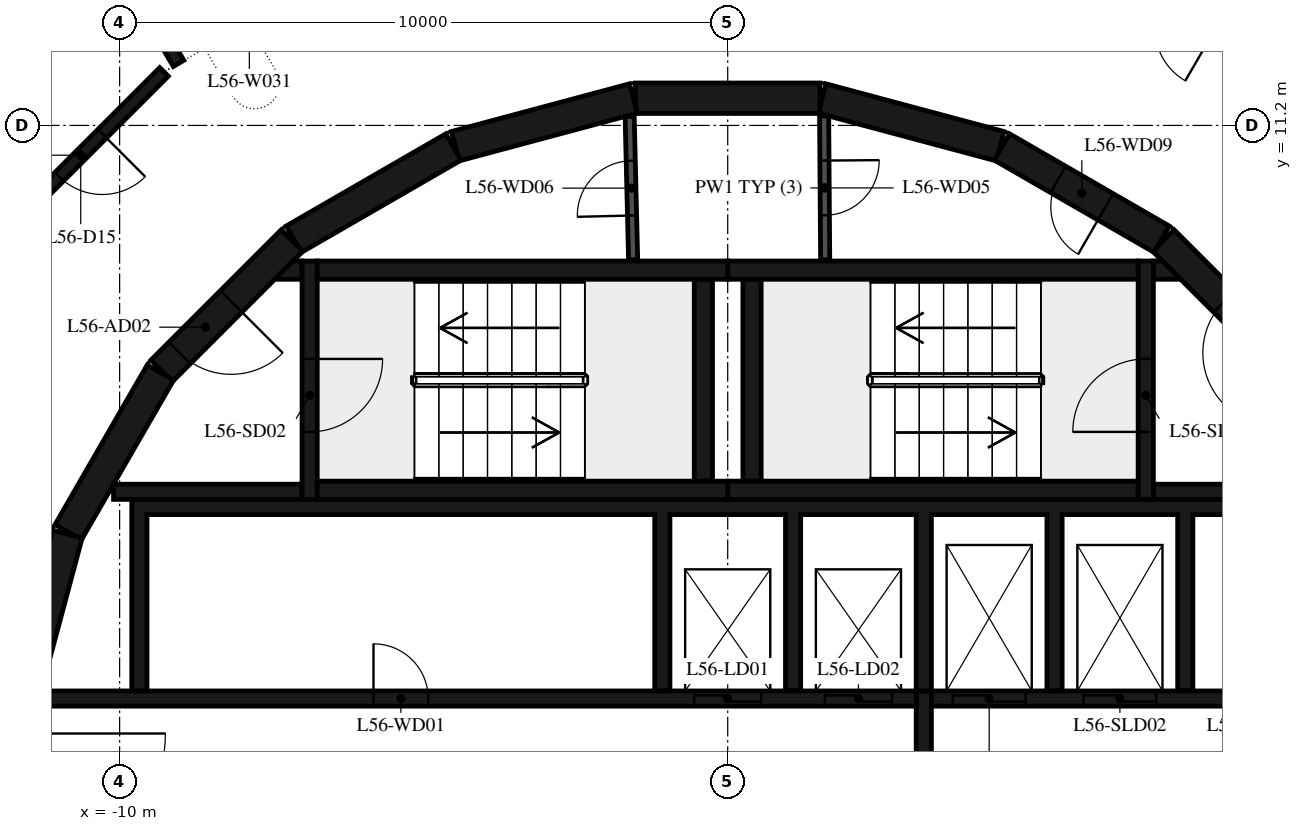
"""IFC4 building model, lengths in metres.
Left out: names, types, materials, properties, quantities, classifications, styles, units other than length and angle.
Written with IfcOpenShell. Run it as: python <this file> out.ifc"""

import sys

from ifc_helpers import new_model, si_unit, direction, frame, frame_2d, origin, place, context, subcontext, project, spatial, polyline, rectangle, outline, extrude, element, fill, save


model = new_model("IFC4")
c1 = context("Model", 3, precision=1e-05, world=origin(), true_north=direction((0.0, 1.0)))
c2 = subcontext(c1, "Body", "Model", "MODEL_VIEW")
j1 = project(units=[si_unit("LENGTHUNIT", "METRE"), si_unit("PLANEANGLEUNIT", "RADIAN")], contexts=[c1])
p1 = place(None, origin())
s1 = spatial("IfcSite", under=j1, at=p1, CompositionType="ELEMENT")
p2 = place(p1, origin())
s2 = spatial("IfcBuilding", under=s1, at=p2, CompositionType="ELEMENT")
p3 = place(p2, frame((0.0, 0.0, 219.9)))
s3 = spatial("IfcBuildingStorey", under=s2, at=p3, CompositionType="ELEMENT", Elevation=219.9)
p4 = place(p3, frame((9.308, 7.164, 0.0), z_axis=(0.0, 0.0, 1.0), x_axis=(-0.707106781187, 0.707106781187, 0.0)))
e1 = element("IfcWall", 1, at=p4, inside=s3, PredefinedType="SHEAR", context=c2, shape_type="SweptSolid", body=[
    extrude(rectangle(XDim=3.032, YDim=0.5, at=frame_2d((1.516, 0.0))), origin(), (0.0, 0.0, 1.0), 6.35),
])
p5 = place(p4, frame((0.416, 0.0, 0.0)))
e2 = element("IfcOpeningElement", 2, at=p5, cuts=e1, PredefinedType="OPENING", context=c2, shape_type="SweptSolid", body=[
    extrude(rectangle(XDim=1.2, YDim=2.1, at=frame_2d((0.6, 1.05))), frame((0.0, 0.26, 0.0), z_axis=(0.0, -1.0, 0.0), x_axis=(1.0, 0.0, 0.0)), (0.0, 0.0, 1.0), 0.52),
])
p6 = place(p3, frame((7.137, 9.329, 0.0), z_axis=(0.0, 0.0, 1.0), x_axis=(-0.865975092491, 0.500087131594, 0.0)))
e3 = element("IfcWall", 3, at=p6, inside=s3, PredefinedType="SHEAR", context=c2, shape_type="SweptSolid", body=[
    extrude(rectangle(XDim=3.033, YDim=0.5, at=frame_2d((1.516, 0.0))), origin(), (0.0, 0.0, 1.0), 6.35),
])
p7 = place(p6, frame((1.066, 0.0, 0.0)))
e4 = element("IfcOpeningElement", 4, at=p7, cuts=e3, PredefinedType="OPENING", context=c2, shape_type="SweptSolid", body=[
    extrude(rectangle(XDim=0.9, YDim=2.1, at=frame_2d((0.45, 1.05))), frame((0.0, 0.26, 0.0), z_axis=(0.0, -1.0, 0.0), x_axis=(1.0, 0.0, 0.0)), (0.0, 0.0, 1.0), 0.52),
])
for number, where, z_axis, x_axis in (
    (5, (4.479, 10.858, 0.0), (0.0, 0.0, 1.0), (-0.966, 0.259, 0.0)),
    (6, (1.516, 11.647, 0.0), (0.0, 0.0, 1.0), (-1.0, 0.0, 0.0)),
    (7, (-1.55, 11.643, 0.0), (0.0, 0.0, 1.0), (-0.966, -0.259, 0.0)),
    (8, (-4.51, 10.845, 0.0), (0.0, 0.0, 1.0), (-0.866, -0.5, 0.0)),
):
    element("IfcWall", number, at=place(p3, frame(where, z_axis=z_axis, x_axis=x_axis)), inside=s3, PredefinedType="SHEAR", context=c2, shape_type="SweptSolid", body=[
        extrude(rectangle(XDim=3.033, YDim=0.5, at=frame_2d((1.516, 0.0))), origin(), (0.0, 0.0, 1.0), 6.35),
    ])
p8 = place(p3, frame((-7.164, 9.308, 0.0), z_axis=(0.0, 0.0, 1.0), x_axis=(-0.707106781187, -0.707106781187, 0.0)))
e9 = element("IfcWall", 9, at=p8, inside=s3, PredefinedType="SHEAR", context=c2, shape_type="SweptSolid", body=[
    extrude(rectangle(XDim=3.032, YDim=0.5, at=frame_2d((1.516, 0.0))), origin(), (0.0, 0.0, 1.0), 6.35),
])
p9 = place(p8, frame((1.416, 0.0, 0.0)))
e10 = element("IfcOpeningElement", 10, at=p9, cuts=e9, PredefinedType="OPENING", context=c2, shape_type="SweptSolid", body=[
    extrude(rectangle(XDim=1.2, YDim=2.1, at=frame_2d((0.6, 1.05))), frame((0.0, 0.26, 0.0), z_axis=(0.0, -1.0, 0.0), x_axis=(1.0, 0.0, 0.0)), (0.0, 0.0, 1.0), 0.52),
])
for number, where, z_axis, x_axis in (
    (11, (-9.329, 7.137, 0.0), (0.0, 0.0, 1.0), (-0.5, -0.866, 0.0)),
    (12, (-10.858, 4.479, 0.0), (0.0, 0.0, 1.0), (-0.259, -0.966, 0.0)),
):
    element("IfcWall", number, at=place(p3, frame(where, z_axis=z_axis, x_axis=x_axis)), inside=s3, PredefinedType="SHEAR", context=c2, shape_type="SweptSolid", body=[
        extrude(rectangle(XDim=3.033, YDim=0.5, at=frame_2d((1.516, 0.0))), origin(), (0.0, 0.0, 1.0), 6.35),
    ])
for number, where, z_axis, x_axis in (
    (13, (0.0, 5.2, 0.0), (0.0, 0.0, 1.0), (1.0, 0.0, 0.0)),
    (14, (0.0, 8.82, 0.0), (0.0, 0.0, 1.0), (1.0, 0.0, 0.0)),
):
    element("IfcWall", number, at=place(p3, frame(where, z_axis=z_axis, x_axis=x_axis)), inside=s3, PredefinedType="SHEAR", context=c2, shape_type="SweptSolid", body=[
        extrude(rectangle(XDim=6.75, YDim=0.3, at=frame_2d((3.375, 0.0))), origin(), (0.0, 0.0, 1.0), 6.35),
    ])
p10 = place(p3, frame((0.4, 5.35, 0.0), z_axis=(0.0, 0.0, 1.0), x_axis=(0.0, 1.0, 0.0)))
e15 = element("IfcWall", 15, at=p10, inside=s3, PredefinedType="SHEAR", context=c2, shape_type="SweptSolid", body=[
    extrude(rectangle(XDim=3.32, YDim=0.3, at=frame_2d((1.66, 0.0))), origin(), (0.0, 0.0, 1.0), 6.35),
])
p11 = place(p3, frame((6.875, 5.05, 0.0), z_axis=(0.0, 0.0, 1.0), x_axis=(0.0, 1.0, 0.0)))
e16 = element("IfcWall", 16, at=p11, inside=s3, PredefinedType="SHEAR", context=c2, shape_type="SweptSolid", body=[
    extrude(rectangle(XDim=3.92, YDim=0.25, at=frame_2d((1.96, 0.0))), origin(), (0.0, 0.0, 1.0), 6.35),
])
p12 = place(p11, frame((1.11, 0.0, 0.0)))
e17 = element("IfcOpeningElement", 17, at=p12, cuts=e16, PredefinedType="OPENING", context=c2, shape_type="SweptSolid", body=[
    extrude(rectangle(XDim=1.2, YDim=2.1, at=frame_2d((0.6, 1.05))), frame((0.0, 0.135, 0.0), z_axis=(0.0, -1.0, 0.0), x_axis=(1.0, 0.0, 0.0)), (0.0, 0.0, 1.0), 0.27),
])
p13 = place(p3, frame((7.0, 5.175, 0.0), z_axis=(0.0, 0.0, 1.0), x_axis=(1.0, 0.0, 0.0)))
e18 = element("IfcWall", 18, at=p13, inside=s3, PredefinedType="SHEAR", context=c2, shape_type="SweptSolid", body=[
    extrude(rectangle(XDim=3.1, YDim=0.25, at=frame_2d((1.55, 0.0))), origin(), (0.0, 0.0, 1.0), 6.35),
])
p14 = place(p3, origin())
e19 = element("IfcWall", 19, at=p14, inside=s3, PredefinedType="SHEAR", context=c2, shape_type="SweptSolid", body=[
    extrude(outline(polyline([(7.448, 8.67), (7.0, 8.67), (7.0, 8.97), (7.148, 8.97), (7.448, 8.67)])), origin(), (0.0, 0.0, 1.0), 6.35),
])
for number, where, z_axis, x_axis in (
    (20, (-6.75, 5.2, 0.0), (0.0, 0.0, 1.0), (1.0, 0.0, 0.0)),
    (21, (-6.75, 8.82, 0.0), (0.0, 0.0, 1.0), (1.0, 0.0, 0.0)),
):
    element("IfcWall", number, at=place(p3, frame(where, z_axis=z_axis, x_axis=x_axis)), inside=s3, PredefinedType="SHEAR", context=c2, shape_type="SweptSolid", body=[
        extrude(rectangle(XDim=6.75, YDim=0.3, at=frame_2d((3.375, 0.0))), origin(), (0.0, 0.0, 1.0), 6.35),
    ])
p15 = place(p3, frame((-0.4, 5.35, 0.0), z_axis=(0.0, 0.0, 1.0), x_axis=(0.0, 1.0, 0.0)))
e22 = element("IfcWall", 22, at=p15, inside=s3, PredefinedType="SHEAR", context=c2, shape_type="SweptSolid", body=[
    extrude(rectangle(XDim=3.32, YDim=0.3, at=frame_2d((1.66, 0.0))), origin(), (0.0, 0.0, 1.0), 6.35),
])
p16 = place(p3, frame((-6.875, 8.97, 0.0), z_axis=(0.0, 0.0, 1.0), x_axis=(0.0, -1.0, 0.0)))
e23 = element("IfcWall", 23, at=p16, inside=s3, PredefinedType="SHEAR", context=c2, shape_type="SweptSolid", body=[
    extrude(rectangle(XDim=3.92, YDim=0.25, at=frame_2d((1.96, 0.0))), origin(), (0.0, 0.0, 1.0), 6.35),
])
p17 = place(p16, frame((1.61, 0.0, 0.0)))
e24 = element("IfcOpeningElement", 24, at=p17, cuts=e23, PredefinedType="OPENING", context=c2, shape_type="SweptSolid", body=[
    extrude(rectangle(XDim=1.2, YDim=2.1, at=frame_2d((0.6, 1.05))), frame((0.0, 0.135, 0.0), z_axis=(0.0, -1.0, 0.0), x_axis=(1.0, 0.0, 0.0)), (0.0, 0.0, 1.0), 0.27),
])
p18 = place(p3, frame((-7.0, 5.175, 0.0), z_axis=(0.0, 0.0, 1.0), x_axis=(-1.0, 0.0, 0.0)))
e25 = element("IfcWall", 25, at=p18, inside=s3, PredefinedType="SHEAR", context=c2, shape_type="SweptSolid", body=[
    extrude(rectangle(XDim=3.1, YDim=0.25, at=frame_2d((1.55, 0.0))), origin(), (0.0, 0.0, 1.0), 6.35),
])
p19 = place(p3, origin())
e26 = element("IfcWall", 26, at=p19, inside=s3, PredefinedType="SHEAR", context=c2, shape_type="SweptSolid", body=[
    extrude(outline(polyline([(-7.148, 8.97), (-7.0, 8.97), (-7.0, 8.67), (-7.448, 8.67), (-7.148, 8.97)])), origin(), (0.0, 0.0, 1.0), 6.35),
])
p20 = place(p3, origin())
e27 = element("IfcWall", 27, at=p20, inside=s3, PredefinedType="SHEAR", context=c2, shape_type="SweptSolid", body=[
    extrude(outline(polyline([(-9.55, 4.8), (-1.2, 4.8), (-1.2, 1.9), (-0.95, 1.9), (-0.95, 4.8), (0.95, 4.8), (0.95, 1.9), (1.2, 1.9), (1.2, 4.8), (3.1, 4.8), (3.1, 1.9), (3.35, 1.9), (3.35, 4.8), (5.25, 4.8), (5.25, 1.9), (5.5, 1.9), (5.5, 4.8), (7.4, 4.8), (7.4, 1.9), (7.65, 1.9), (7.65, 4.8), (9.55, 4.8), (9.55, 1.9), (9.8, 1.9), (9.8, 4.8), (9.8, 5.05), (-9.8, 5.05), (-9.8, 4.8), (-9.8, 1.9), (-9.55, 1.9), (-9.55, 4.8)])), origin(), (0.0, 0.0, 1.0), 6.35),
])
p21 = place(p3, frame((-11.28, 1.775, 0.0), z_axis=(0.0, 0.0, 1.0), x_axis=(1.0, 0.0, 0.0)))
e28 = element("IfcWall", 28, at=p21, inside=s3, PredefinedType="SHEAR", context=c2, shape_type="SweptSolid", body=[
    extrude(rectangle(XDim=14.38, YDim=0.25, at=frame_2d((7.19, 0.0))), origin(), (0.0, 0.0, 1.0), 6.35),
])
p22 = place(p21, frame((10.73, 0.0, 0.0)))
e29 = element("IfcOpeningElement", 29, at=p22, cuts=e28, PredefinedType="OPENING", context=c2, shape_type="SweptSolid", body=[
    extrude(rectangle(XDim=1.1, YDim=2.1, at=frame_2d((0.55, 1.05))), frame((0.0, 0.135, 0.0), z_axis=(0.0, -1.0, 0.0), x_axis=(1.0, 0.0, 0.0)), (0.0, 0.0, 1.0), 0.27),
])
p23 = place(p21, frame((12.88, 0.0, 0.0)))
e30 = element("IfcOpeningElement", 30, at=p23, cuts=e28, PredefinedType="OPENING", context=c2, shape_type="SweptSolid", body=[
    extrude(rectangle(XDim=1.1, YDim=2.1, at=frame_2d((0.55, 1.05))), frame((0.0, 0.135, 0.0), z_axis=(0.0, -1.0, 0.0), x_axis=(1.0, 0.0, 0.0)), (0.0, 0.0, 1.0), 0.27),
])
p24 = place(p21, frame((5.455, 0.0, 0.0)))
e31 = element("IfcOpeningElement", 31, at=p24, cuts=e28, PredefinedType="OPENING", context=c2, shape_type="SweptSolid", body=[
    extrude(rectangle(XDim=0.9, YDim=2.1, at=frame_2d((0.45, 1.05))), frame((0.0, 0.135, 0.0), z_axis=(0.0, -1.0, 0.0), x_axis=(1.0, 0.0, 0.0)), (0.0, 0.0, 1.0), 0.27),
])
p25 = place(p3, frame((3.35, 1.775, 0.0), z_axis=(0.0, 0.0, 1.0), x_axis=(1.0, 0.0, 0.0)))
e32 = element("IfcWall", 32, at=p25, inside=s3, PredefinedType="SHEAR", context=c2, shape_type="SweptSolid", body=[
    extrude(rectangle(XDim=7.93, YDim=0.25, at=frame_2d((3.965, 0.0))), origin(), (0.0, 0.0, 1.0), 6.35),
])
p26 = place(p25, frame((0.35, 0.0, 0.0)))
e33 = element("IfcOpeningElement", 33, at=p26, cuts=e32, PredefinedType="OPENING", context=c2, shape_type="SweptSolid", body=[
    extrude(rectangle(XDim=1.2, YDim=2.4, at=frame_2d((0.6, 1.2))), frame((0.0, 0.135, 0.0), z_axis=(0.0, -1.0, 0.0), x_axis=(1.0, 0.0, 0.0)), (0.0, 0.0, 1.0), 0.27),
])
p27 = place(p25, frame((2.5, 0.0, 0.0)))
e34 = element("IfcOpeningElement", 34, at=p27, cuts=e32, PredefinedType="OPENING", context=c2, shape_type="SweptSolid", body=[
    extrude(rectangle(XDim=1.2, YDim=2.4, at=frame_2d((0.6, 1.2))), frame((0.0, 0.135, 0.0), z_axis=(0.0, -1.0, 0.0), x_axis=(1.0, 0.0, 0.0)), (0.0, 0.0, 1.0), 0.27),
])
p28 = place(p25, frame((4.8, 0.0, 0.0)))
e35 = element("IfcOpeningElement", 35, at=p28, cuts=e32, PredefinedType="OPENING", context=c2, shape_type="SweptSolid", body=[
    extrude(rectangle(XDim=0.9, YDim=2.1, at=frame_2d((0.45, 1.05))), frame((0.0, 0.135, 0.0), z_axis=(0.0, -1.0, 0.0), x_axis=(1.0, 0.0, 0.0)), (0.0, 0.0, 1.0), 0.27),
])
p29 = place(p3, frame((3.225, -1.9, 0.0), z_axis=(0.0, 0.0, 1.0), x_axis=(0.0, 1.0, 0.0)))
e36 = element("IfcWall", 36, at=p29, inside=s3, PredefinedType="SHEAR", context=c2, shape_type="SweptSolid", body=[
    extrude(rectangle(XDim=3.8, YDim=0.25, at=frame_2d((1.9, 0.0))), origin(), (0.0, 0.0, 1.0), 6.35),
])
p30 = place(p3, frame((1.586, 11.354, 0.0), z_axis=(0.0, 0.0, 1.0), x_axis=(0.007227482881, -0.999973881405, 0.0)))
e37 = element("IfcWall", 37, at=p30, inside=s3, PredefinedType="PARTITIONING", context=c2, shape_type="SweptSolid", body=[
    extrude(rectangle(XDim=2.365, YDim=0.15, at=frame_2d((1.182, 0.0))), origin(), (0.0, 0.0, 1.0), 6.35),
])
p31 = place(p30, frame((0.732, 0.0, 0.0)))
e38 = element("IfcOpeningElement", 38, at=p31, cuts=e37, PredefinedType="OPENING", context=c2, shape_type="SweptSolid", body=[
    extrude(rectangle(XDim=0.9, YDim=2.1, at=frame_2d((0.45, 1.05))), frame((0.0, 0.085, 0.0), z_axis=(0.0, -1.0, 0.0), x_axis=(1.0, 0.0, 0.0)), (0.0, 0.0, 1.0), 0.17),
])
p32 = place(p3, frame((-1.555, 8.99, 0.0), z_axis=(0.0, 0.0, 1.0), x_axis=(-0.024125549686, 0.999708936567, 0.0)))
e39 = element("IfcWall", 39, at=p32, inside=s3, PredefinedType="PARTITIONING", context=c2, shape_type="SweptSolid", body=[
    extrude(rectangle(XDim=2.358, YDim=0.15, at=frame_2d((1.179, 0.0))), origin(), (0.0, 0.0, 1.0), 6.35),
])
p33 = place(p32, frame((0.729, 0.0, 0.0)))
e40 = element("IfcOpeningElement", 40, at=p33, cuts=e39, PredefinedType="OPENING", context=c2, shape_type="SweptSolid", body=[
    extrude(rectangle(XDim=0.9, YDim=2.1, at=frame_2d((0.45, 1.05))), frame((0.0, 0.085, 0.0), z_axis=(0.0, -1.0, 0.0), x_axis=(1.0, 0.0, 0.0)), (0.0, 0.0, 1.0), 0.17),
])
p34 = place(p3, frame((-11.229, 15.934, 0.0), z_axis=(0.0, 0.0, 1.0), x_axis=(0.509487598, -0.860477999419, 0.0)))
e41 = element("IfcWall", 41, at=p34, inside=s3, PredefinedType="PARTITIONING", context=c2, shape_type="SweptSolid", body=[
    extrude(rectangle(XDim=4.316, YDim=0.2, at=frame_2d((2.158, 0.0))), origin(), (0.0, 0.0, 1.0), 6.35),
])
p35 = place(p3, frame((-9.27, 12.08, 0.0), z_axis=(0.0, 0.0, 1.0), x_axis=(-0.707106781187, -0.707106781187, 0.0)))
e42 = element("IfcWall", 42, at=p35, inside=s3, PredefinedType="PARTITIONING", context=c2, shape_type="SweptSolid", body=[
    extrude(rectangle(XDim=3.874, YDim=0.2, at=frame_2d((1.937, 0.0))), origin(), (0.0, 0.0, 1.0), 6.35),
])
p36 = place(p35, frame((1.437, 0.0, 0.0)))
e43 = element("IfcOpeningElement", 43, at=p36, cuts=e42, PredefinedType="OPENING", context=c2, shape_type="SweptSolid", body=[
    extrude(rectangle(XDim=1.0, YDim=2.1, at=frame_2d((0.5, 1.05))), frame((0.0, 0.11, 0.0), z_axis=(0.0, -1.0, 0.0), x_axis=(1.0, 0.0, 0.0)), (0.0, 0.0, 1.0), 0.22),
])
p37 = place(p3, frame((9.27, 12.08, 0.0), z_axis=(0.0, 0.0, 1.0), x_axis=(-0.865601686425, 0.500733182901, 0.0)))
e44 = element("IfcWall", 44, at=p37, inside=s3, PredefinedType="PARTITIONING", context=c2, shape_type="SweptSolid", body=[
    extrude(rectangle(XDim=3.874, YDim=0.2, at=frame_2d((1.937, 0.0))), origin(), (0.0, 0.0, 1.0), 6.35),
])
p38 = place(p37, frame((1.437, 0.0, 0.0)))
e45 = element("IfcOpeningElement", 45, at=p38, cuts=e44, PredefinedType="OPENING", context=c2, shape_type="SweptSolid", body=[
    extrude(rectangle(XDim=1.0, YDim=2.1, at=frame_2d((0.5, 1.05))), frame((0.0, 0.11, 0.0), z_axis=(0.0, -1.0, 0.0), x_axis=(1.0, 0.0, 0.0)), (0.0, 0.0, 1.0), 0.22),
])
p39 = place(p12, origin())
e46 = element("IfcDoor", 46, at=p39, inside=s3, OperationType="SINGLE_SWING_LEFT", PredefinedType="DOOR", context=c2, shape_type="SweptSolid", body=[
    extrude(rectangle(XDim=1.2, YDim=2.1, at=frame_2d((0.6, 1.05))), frame((0.0, 0.025, 0.0), z_axis=(0.0, -1.0, 0.0), x_axis=(1.0, 0.0, 0.0)), (0.0, 0.0, 1.0), 0.05),
])
fill(e17, e46)
p40 = place(p5, origin())
e47 = element("IfcDoor", 47, at=p40, inside=s3, OperationType="SINGLE_SWING_RIGHT", PredefinedType="DOOR", context=c2, shape_type="SweptSolid", body=[
    extrude(rectangle(XDim=1.2, YDim=2.1, at=frame_2d((0.6, 1.05))), frame((0.0, 0.025, 0.0), z_axis=(0.0, -1.0, 0.0), x_axis=(1.0, 0.0, 0.0)), (0.0, 0.0, 1.0), 0.05),
])
fill(e2, e47)
p41 = place(p17, origin())
e48 = element("IfcDoor", 48, at=p41, inside=s3, OperationType="SINGLE_SWING_LEFT", PredefinedType="DOOR", context=c2, shape_type="SweptSolid", body=[
    extrude(rectangle(XDim=1.2, YDim=2.1, at=frame_2d((0.6, 1.05))), frame((0.0, 0.025, 0.0), z_axis=(0.0, -1.0, 0.0), x_axis=(1.0, 0.0, 0.0)), (0.0, 0.0, 1.0), 0.05),
])
fill(e24, e48)
p42 = place(p9, origin())
e49 = element("IfcDoor", 49, at=p42, inside=s3, OperationType="SINGLE_SWING_RIGHT", PredefinedType="DOOR", context=c2, shape_type="SweptSolid", body=[
    extrude(rectangle(XDim=1.2, YDim=2.1, at=frame_2d((0.6, 1.05))), frame((0.0, 0.025, 0.0), z_axis=(0.0, -1.0, 0.0), x_axis=(1.0, 0.0, 0.0)), (0.0, 0.0, 1.0), 0.05),
])
fill(e10, e49)
p43 = place(p22, origin())
e50 = element("IfcDoor", 50, at=p43, inside=s3, OperationType="DOUBLE_DOOR_SLIDING", PredefinedType="DOOR", context=c2, shape_type="SweptSolid", body=[
    extrude(rectangle(XDim=1.1, YDim=2.1, at=frame_2d((0.55, 1.05))), frame((0.0, 0.025, 0.0), z_axis=(0.0, -1.0, 0.0), x_axis=(1.0, 0.0, 0.0)), (0.0, 0.0, 1.0), 0.05),
])
fill(e29, e50)
p44 = place(p23, origin())
e51 = element("IfcDoor", 51, at=p44, inside=s3, OperationType="DOUBLE_DOOR_SLIDING", PredefinedType="DOOR", context=c2, shape_type="SweptSolid", body=[
    extrude(rectangle(XDim=1.1, YDim=2.1, at=frame_2d((0.55, 1.05))), frame((0.0, 0.025, 0.0), z_axis=(0.0, -1.0, 0.0), x_axis=(1.0, 0.0, 0.0)), (0.0, 0.0, 1.0), 0.05),
])
fill(e30, e51)
p45 = place(p26, origin())
e52 = element("IfcDoor", 52, at=p45, inside=s3, OperationType="DOUBLE_DOOR_SLIDING", PredefinedType="DOOR", context=c2, shape_type="SweptSolid", body=[
    extrude(rectangle(XDim=1.2, YDim=2.4, at=frame_2d((0.6, 1.2))), frame((0.0, 0.025, 0.0), z_axis=(0.0, -1.0, 0.0), x_axis=(1.0, 0.0, 0.0)), (0.0, 0.0, 1.0), 0.05),
])
fill(e33, e52)
p46 = place(p27, origin())
e53 = element("IfcDoor", 53, at=p46, inside=s3, OperationType="DOUBLE_DOOR_SLIDING", PredefinedType="DOOR", context=c2, shape_type="SweptSolid", body=[
    extrude(rectangle(XDim=1.2, YDim=2.4, at=frame_2d((0.6, 1.2))), frame((0.0, 0.025, 0.0), z_axis=(0.0, -1.0, 0.0), x_axis=(1.0, 0.0, 0.0)), (0.0, 0.0, 1.0), 0.05),
])
fill(e34, e53)
p47 = place(p24, origin())
e54 = element("IfcDoor", 54, at=p47, inside=s3, OperationType="SINGLE_SWING_LEFT", PredefinedType="DOOR", context=c2, shape_type="SweptSolid", body=[
    extrude(rectangle(XDim=0.9, YDim=2.1, at=frame_2d((0.45, 1.05))), frame((0.0, 0.025, 0.0), z_axis=(0.0, -1.0, 0.0), x_axis=(1.0, 0.0, 0.0)), (0.0, 0.0, 1.0), 0.05),
])
fill(e31, e54)
p48 = place(p31, origin())
e55 = element("IfcDoor", 55, at=p48, inside=s3, OperationType="SINGLE_SWING_LEFT", PredefinedType="DOOR", context=c2, shape_type="SweptSolid", body=[
    extrude(rectangle(XDim=0.9, YDim=2.1, at=frame_2d((0.45, 1.05))), frame((0.0, 0.025, 0.0), z_axis=(0.0, -1.0, 0.0), x_axis=(1.0, 0.0, 0.0)), (0.0, 0.0, 1.0), 0.05),
])
fill(e38, e55)
p49 = place(p33, origin())
e56 = element("IfcDoor", 56, at=p49, inside=s3, OperationType="SINGLE_SWING_RIGHT", PredefinedType="DOOR", context=c2, shape_type="SweptSolid", body=[
    extrude(rectangle(XDim=0.9, YDim=2.1, at=frame_2d((0.45, 1.05))), frame((0.0, 0.025, 0.0), z_axis=(0.0, -1.0, 0.0), x_axis=(1.0, 0.0, 0.0)), (0.0, 0.0, 1.0), 0.05),
])
fill(e40, e56)
p50 = place(p7, origin())
e57 = element("IfcDoor", 57, at=p50, inside=s3, OperationType="SINGLE_SWING_LEFT", PredefinedType="DOOR", context=c2, shape_type="SweptSolid", body=[
    extrude(rectangle(XDim=0.9, YDim=2.1, at=frame_2d((0.45, 1.05))), frame((0.0, 0.025, 0.0), z_axis=(0.0, -1.0, 0.0), x_axis=(1.0, 0.0, 0.0)), (0.0, 0.0, 1.0), 0.05),
])
fill(e4, e57)
p51 = place(p36, origin())
e58 = element("IfcDoor", 58, at=p51, inside=s3, OperationType="SINGLE_SWING_LEFT", PredefinedType="DOOR", context=c2, shape_type="SweptSolid", body=[
    extrude(rectangle(XDim=1.0, YDim=2.1, at=frame_2d((0.5, 1.05))), frame((0.0, 0.025, 0.0), z_axis=(0.0, -1.0, 0.0), x_axis=(1.0, 0.0, 0.0)), (0.0, 0.0, 1.0), 0.05),
])
fill(e43, e58)
save(model, sys.argv[1])
